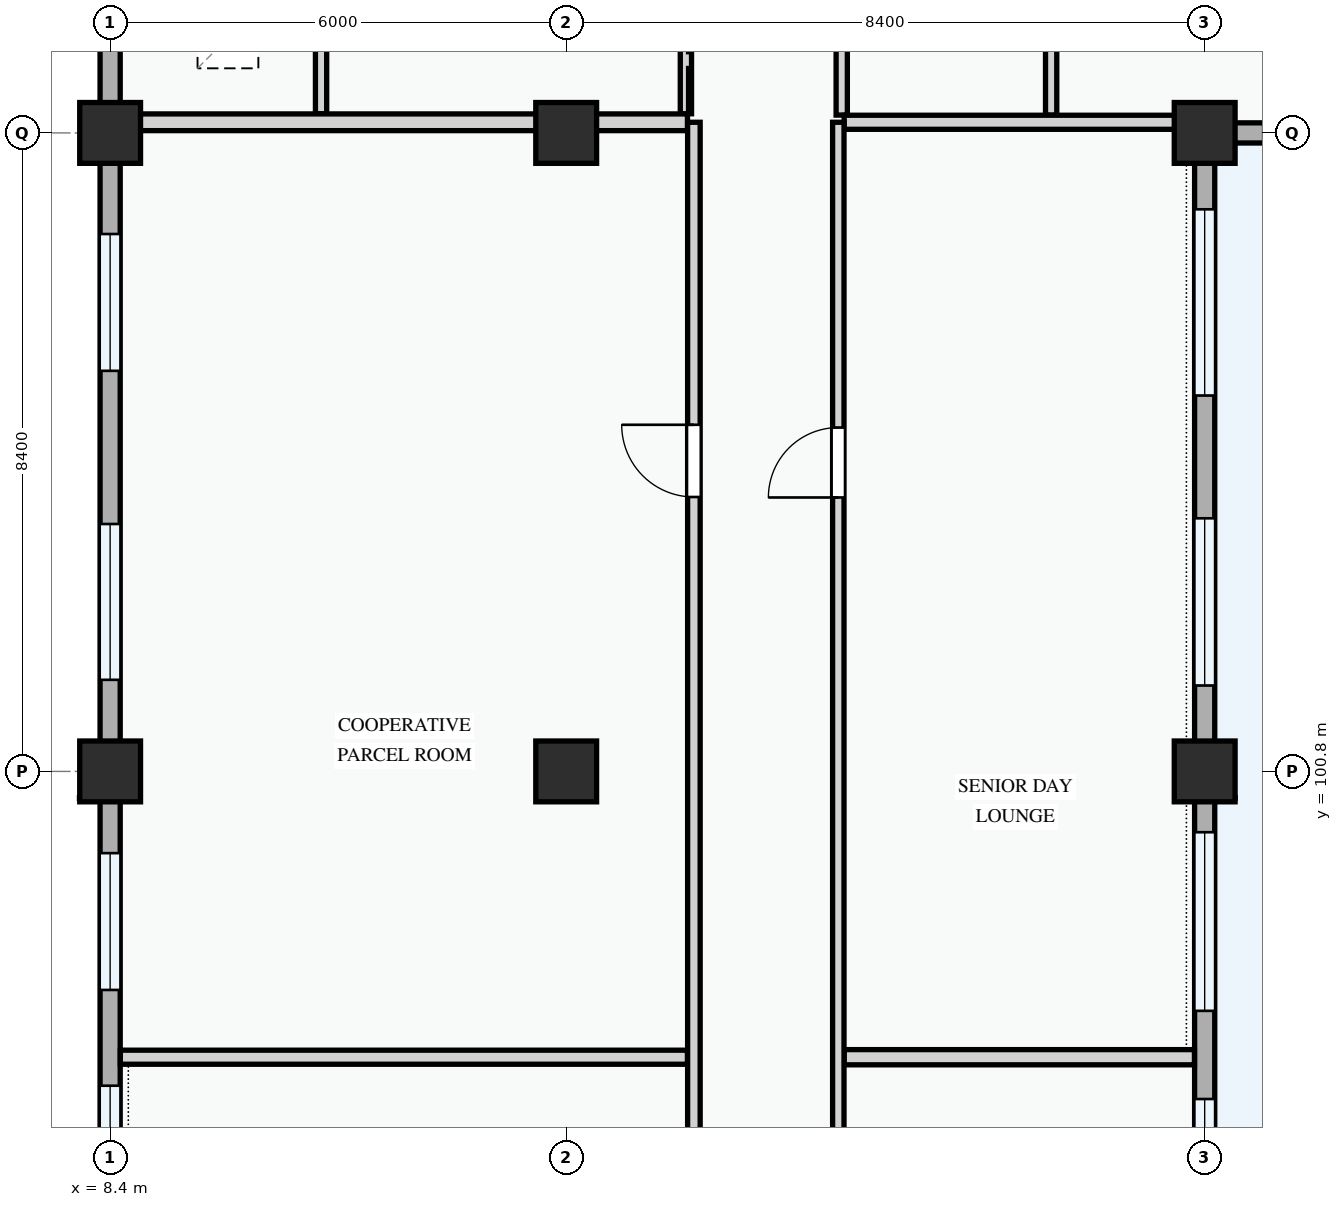
"""IFC4 building model, lengths in metres.
Left out: names, types, materials, properties, quantities, classifications, styles, units other than length and angle.
Written with IfcOpenShell. Run it as: python <this file> out.ifc"""

import sys

from ifc_helpers import new_model, si_unit, direction, frame, frame_2d, origin, origin_2d, place, context, subcontext, project, spatial, rectangle, extrude, element, fill, save


model = new_model("IFC4")
c1 = context("Model", 3, precision=1e-05, world=origin(), true_north=direction((0.0, 1.0)))
c2 = subcontext(c1, "Body", "Model", "MODEL_VIEW")
j1 = project(units=[si_unit("LENGTHUNIT", "METRE"), si_unit("PLANEANGLEUNIT", "RADIAN")], contexts=[c1])
p1 = place(None, origin())
s1 = spatial("IfcSite", under=j1, at=p1, CompositionType="ELEMENT")
p2 = place(p1, origin())
s2 = spatial("IfcBuilding", under=s1, at=p2, CompositionType="ELEMENT")
p3 = place(p2, origin())
s3 = spatial("IfcBuildingStorey", under=s2, at=p3, CompositionType="ELEMENT", Elevation=0.0)
for number, where, z_axis, x_axis in (
    (1, (8.4, 100.8, 0.0), (0.0, 0.0, 1.0), (1.0, 0.0, 0.0)),
    (2, (8.4, 109.2, 0.0), (0.0, 0.0, 1.0), (1.0, 0.0, 0.0)),
    (3, (14.4, 100.8, 0.0), (0.0, 0.0, 1.0), (1.0, 0.0, 0.0)),
    (4, (14.4, 109.2, 0.0), (0.0, 0.0, 1.0), (1.0, 0.0, 0.0)),
    (5, (22.8, 100.8, 0.0), (0.0, 0.0, 1.0), (1.0, 0.0, 0.0)),
    (6, (22.8, 109.2, 0.0), (0.0, 0.0, 1.0), (1.0, 0.0, 0.0)),
):
    element("IfcColumn", number, at=place(p3, frame(where, z_axis=z_axis, x_axis=x_axis)), inside=s3, PredefinedType="COLUMN", context=c2, shape_type="SweptSolid", body=[
        extrude(rectangle(XDim=0.8, YDim=0.8, at=origin_2d()), origin(), (0.0, 0.0, 1.0), 4.5),
    ])
p4 = place(p3, frame((22.8, 109.2, 0.0), z_axis=(0.0, 0.0, 1.0), x_axis=(1.0, 0.0, 0.0)))
e7 = element("IfcWall", 7, at=p4, inside=s3, PredefinedType="STANDARD", context=c2, shape_type="SweptSolid", body=[
    extrude(rectangle(XDim=6.0, YDim=0.265, at=frame_2d((3.0, 0.0))), origin(), (0.0, 0.0, 1.0), 3.585),
])
p5 = place(p4, frame((0.77, 0.0, 0.78)))
e8 = element("IfcOpeningElement", 8, at=p5, cuts=e7, PredefinedType="OPENING", context=c2, shape_type="SweptSolid", body=[
    extrude(rectangle(XDim=1.0, YDim=1.25, at=frame_2d((0.5, 0.625))), frame((0.0, 0.143, 0.0), z_axis=(0.0, -1.0, 0.0), x_axis=(1.0, 0.0, 0.0)), (0.0, 0.0, 1.0), 0.285),
])
p6 = place(p4, frame((3.405, 0.0, 0.78)))
e9 = element("IfcOpeningElement", 9, at=p6, cuts=e7, PredefinedType="OPENING", context=c2, shape_type="SweptSolid", body=[
    extrude(rectangle(XDim=1.35, YDim=1.55, at=frame_2d((0.675, 0.775))), frame((0.0, 0.143, 0.0), z_axis=(0.0, -1.0, 0.0), x_axis=(1.0, 0.0, 0.0)), (0.0, 0.0, 1.0), 0.285),
])
p7 = place(p3, frame((8.4, 115.2, 0.0), z_axis=(0.0, 0.0, 1.0), x_axis=(0.0, -1.0, 0.0)))
e10 = element("IfcWall", 10, at=p7, inside=s3, PredefinedType="STANDARD", context=c2, shape_type="SweptSolid", body=[
    extrude(rectangle(XDim=6.0, YDim=0.265, at=frame_2d((3.0, 0.0))), origin(), (0.0, 0.0, 1.0), 3.585),
])
p8 = place(p7, frame((0.545, 0.0, 0.78)))
e11 = element("IfcOpeningElement", 11, at=p8, cuts=e10, PredefinedType="OPENING", context=c2, shape_type="SweptSolid", body=[
    extrude(rectangle(XDim=0.9, YDim=1.2, at=frame_2d((0.45, 0.6))), frame((0.0, 0.143, 0.0), z_axis=(0.0, -1.0, 0.0), x_axis=(1.0, 0.0, 0.0)), (0.0, 0.0, 1.0), 0.285),
])
p9 = place(p7, frame((2.83, 0.0, 0.78)))
e12 = element("IfcOpeningElement", 12, at=p9, cuts=e10, PredefinedType="OPENING", context=c2, shape_type="SweptSolid", body=[
    extrude(rectangle(XDim=1.95, YDim=1.65, at=frame_2d((0.975, 0.825))), frame((0.0, 0.143, 0.0), z_axis=(0.0, -1.0, 0.0), x_axis=(1.0, 0.0, 0.0)), (0.0, 0.0, 1.0), 0.285),
])
p10 = place(p3, frame((8.4, 109.2, 0.0), z_axis=(0.0, 0.0, 1.0), x_axis=(0.0, -1.0, 0.0)))
e13 = element("IfcWall", 13, at=p10, inside=s3, PredefinedType="STANDARD", context=c2, shape_type="SweptSolid", body=[
    extrude(rectangle(XDim=8.4, YDim=0.265, at=frame_2d((4.2, 0.0))), origin(), (0.0, 0.0, 1.0), 3.485),
])
p11 = place(p10, frame((1.33, 0.0, 0.78)))
e14 = element("IfcOpeningElement", 14, at=p11, cuts=e13, PredefinedType="OPENING", context=c2, shape_type="SweptSolid", body=[
    extrude(rectangle(XDim=1.8, YDim=1.5, at=frame_2d((0.9, 0.75))), frame((0.0, 0.143, 0.0), z_axis=(0.0, -1.0, 0.0), x_axis=(1.0, 0.0, 0.0)), (0.0, 0.0, 1.0), 0.285),
])
p12 = place(p10, frame((5.145, 0.0, 0.78)))
e15 = element("IfcOpeningElement", 15, at=p12, cuts=e13, PredefinedType="OPENING", context=c2, shape_type="SweptSolid", body=[
    extrude(rectangle(XDim=2.05, YDim=1.6, at=frame_2d((1.025, 0.8))), frame((0.0, 0.143, 0.0), z_axis=(0.0, -1.0, 0.0), x_axis=(1.0, 0.0, 0.0)), (0.0, 0.0, 1.0), 0.285),
])
p13 = place(p3, frame((8.4, 100.8, 0.0), z_axis=(0.0, 0.0, 1.0), x_axis=(0.0, -1.0, 0.0)))
e16 = element("IfcWall", 16, at=p13, inside=s3, PredefinedType="STANDARD", context=c2, shape_type="SweptSolid", body=[
    extrude(rectangle(XDim=6.0, YDim=0.265, at=frame_2d((3.0, 0.0))), origin(), (0.0, 0.0, 1.0), 3.585),
])
p14 = place(p13, frame((1.075, 0.0, 0.78)))
e17 = element("IfcOpeningElement", 17, at=p14, cuts=e16, PredefinedType="OPENING", context=c2, shape_type="SweptSolid", body=[
    extrude(rectangle(XDim=1.8, YDim=1.7, at=frame_2d((0.9, 0.85))), frame((0.0, 0.143, 0.0), z_axis=(0.0, -1.0, 0.0), x_axis=(1.0, 0.0, 0.0)), (0.0, 0.0, 1.0), 0.285),
])
p15 = place(p13, frame((4.135, 0.0, 0.78)))
e18 = element("IfcOpeningElement", 18, at=p15, cuts=e16, PredefinedType="OPENING", context=c2, shape_type="SweptSolid", body=[
    extrude(rectangle(XDim=1.3, YDim=1.4, at=frame_2d((0.65, 0.7))), frame((0.0, 0.143, 0.0), z_axis=(0.0, -1.0, 0.0), x_axis=(1.0, 0.0, 0.0)), (0.0, 0.0, 1.0), 0.285),
])
p16 = place(p3, frame((22.8, 94.8, 0.0), z_axis=(0.0, 0.0, 1.0), x_axis=(0.0, 1.0, 0.0)))
e19 = element("IfcWall", 19, at=p16, inside=s3, PredefinedType="STANDARD", context=c2, shape_type="SweptSolid", body=[
    extrude(rectangle(XDim=6.0, YDim=0.265, at=frame_2d((3.0, 0.0))), origin(), (0.0, 0.0, 1.0), 3.585),
])
p17 = place(p16, frame((0.74, 0.0, 0.78)))
e20 = element("IfcOpeningElement", 20, at=p17, cuts=e19, PredefinedType="OPENING", context=c2, shape_type="SweptSolid", body=[
    extrude(rectangle(XDim=0.95, YDim=1.15, at=frame_2d((0.475, 0.575))), frame((0.0, 0.143, 0.0), z_axis=(0.0, -1.0, 0.0), x_axis=(1.0, 0.0, 0.0)), (0.0, 0.0, 1.0), 0.285),
])
p18 = place(p16, frame((2.85, 0.0, 0.78)))
e21 = element("IfcOpeningElement", 21, at=p18, cuts=e19, PredefinedType="OPENING", context=c2, shape_type="SweptSolid", body=[
    extrude(rectangle(XDim=2.35, YDim=1.55, at=frame_2d((1.175, 0.775))), frame((0.0, 0.143, 0.0), z_axis=(0.0, -1.0, 0.0), x_axis=(1.0, 0.0, 0.0)), (0.0, 0.0, 1.0), 0.285),
])
p19 = place(p3, frame((22.8, 100.8, 0.0), z_axis=(0.0, 0.0, 1.0), x_axis=(0.0, 1.0, 0.0)))
e22 = element("IfcWall", 22, at=p19, inside=s3, PredefinedType="STANDARD", context=c2, shape_type="SweptSolid", body=[
    extrude(rectangle(XDim=8.4, YDim=0.265, at=frame_2d((4.2, 0.0))), origin(), (0.0, 0.0, 1.0), 3.485),
])
p20 = place(p19, frame((1.13, 0.0, 0.78)))
e23 = element("IfcOpeningElement", 23, at=p20, cuts=e22, PredefinedType="OPENING", context=c2, shape_type="SweptSolid", body=[
    extrude(rectangle(XDim=2.2, YDim=1.5, at=frame_2d((1.1, 0.75))), frame((0.0, 0.143, 0.0), z_axis=(0.0, -1.0, 0.0), x_axis=(1.0, 0.0, 0.0)), (0.0, 0.0, 1.0), 0.285),
])
p21 = place(p19, frame((4.945, 0.0, 0.78)))
e24 = element("IfcOpeningElement", 24, at=p21, cuts=e22, PredefinedType="OPENING", context=c2, shape_type="SweptSolid", body=[
    extrude(rectangle(XDim=2.45, YDim=1.75, at=frame_2d((1.225, 0.875))), frame((0.0, 0.143, 0.0), z_axis=(0.0, -1.0, 0.0), x_axis=(1.0, 0.0, 0.0)), (0.0, 0.0, 1.0), 0.285),
])
for number, where, z_axis, x_axis in (
    (25, (11.175, 113.324, 0.0), (0.0, 0.0, 1.0), (0.0, -1.0, 0.0)),
    (26, (15.975, 113.324, 0.0), (0.0, 0.0, 1.0), (0.0, -1.0, 0.0)),
):
    element("IfcWall", number, at=place(p3, frame(where, z_axis=z_axis, x_axis=x_axis)), inside=s3, PredefinedType="PARTITIONING", context=c2, shape_type="SweptSolid", body=[
        extrude(rectangle(XDim=3.872, YDim=0.148, at=frame_2d((1.936, 0.0))), origin(), (0.0, 0.0, 1.0), 4.2),
    ])
for number, where, z_axis, x_axis in (
    (27, (18.025, 113.324, 0.0), (0.0, 0.0, 1.0), (0.0, -1.0, 0.0)),
    (28, (20.78, 113.324, 0.0), (0.0, 0.0, 1.0), (0.0, -1.0, 0.0)),
):
    element("IfcWall", number, at=place(p3, frame(where, z_axis=z_axis, x_axis=x_axis)), inside=s3, PredefinedType="PARTITIONING", context=c2, shape_type="SweptSolid", body=[
        extrude(rectangle(XDim=3.889, YDim=0.148, at=frame_2d((1.945, 0.0))), origin(), (0.0, 0.0, 1.0), 4.2),
    ])
p22 = place(p3, frame((8.534, 97.04, 0.0), z_axis=(0.0, 0.0, 1.0), x_axis=(1.0, 0.0, 0.0)))
e29 = element("IfcWall", 29, at=p22, inside=s3, PredefinedType="PARTITIONING", context=c2, shape_type="SweptSolid", body=[
    extrude(rectangle(XDim=7.461, YDim=0.185, at=frame_2d((3.73, 0.0))), origin(), (0.0, 0.0, 1.0), 4.2),
])
p23 = place(p3, frame((18.057, 97.04, 0.0), z_axis=(0.0, 0.0, 1.0), x_axis=(1.0, 0.0, 0.0)))
e30 = element("IfcWall", 30, at=p23, inside=s3, PredefinedType="PARTITIONING", context=c2, shape_type="SweptSolid", body=[
    extrude(rectangle(XDim=4.609, YDim=0.2, at=frame_2d((2.304, 0.0))), origin(), (0.0, 0.0, 1.0), 4.2),
])
p24 = place(p3, frame((8.534, 109.34, 0.0), z_axis=(0.0, 0.0, 1.0), x_axis=(1.0, 0.0, 0.0)))
e31 = element("IfcWall", 31, at=p24, inside=s3, PredefinedType="PARTITIONING", context=c2, shape_type="SweptSolid", body=[
    extrude(rectangle(XDim=7.461, YDim=0.22, at=frame_2d((3.73, 0.0))), origin(), (0.0, 0.0, 1.0), 3.485),
])
p25 = place(p3, frame((18.057, 109.34, 0.0), z_axis=(0.0, 0.0, 1.0), x_axis=(1.0, 0.0, 0.0)))
e32 = element("IfcWall", 32, at=p25, inside=s3, PredefinedType="PARTITIONING", context=c2, shape_type="SweptSolid", body=[
    extrude(rectangle(XDim=4.683, YDim=0.185, at=frame_2d((2.342, 0.0))), origin(), (0.0, 0.0, 1.0), 3.485),
])
p26 = place(p3, frame((16.08, 72.135, 0.0), z_axis=(0.0, 0.0, 1.0), x_axis=(0.0, 1.0, 0.0)))
e33 = element("IfcWall", 33, at=p26, inside=s3, PredefinedType="PARTITIONING", context=c2, shape_type="SweptSolid", body=[
    extrude(rectangle(XDim=37.206, YDim=0.165, at=frame_2d((18.603, 0.0))), origin(), (0.0, 0.0, 1.0), 4.2),
])
p27 = place(p26, frame((3.566, 0.0, 0.0)))
e34 = element("IfcOpeningElement", 34, at=p27, cuts=e33, PredefinedType="OPENING", context=c2, shape_type="SweptSolid", body=[
    extrude(rectangle(XDim=0.95, YDim=2.1, at=frame_2d((0.475, 1.05))), frame((0.0, 0.093, 0.0), z_axis=(0.0, -1.0, 0.0), x_axis=(1.0, 0.0, 0.0)), (0.0, 0.0, 1.0), 0.185),
])
p28 = place(p26, frame((18.091, 0.0, 0.0)))
e35 = element("IfcOpeningElement", 35, at=p28, cuts=e33, PredefinedType="OPENING", context=c2, shape_type="SweptSolid", body=[
    extrude(rectangle(XDim=0.95, YDim=2.1, at=frame_2d((0.475, 1.05))), frame((0.0, 0.093, 0.0), z_axis=(0.0, -1.0, 0.0), x_axis=(1.0, 0.0, 0.0)), (0.0, 0.0, 1.0), 0.185),
])
p29 = place(p26, frame((32.276, 0.0, 0.0)))
e36 = element("IfcOpeningElement", 36, at=p29, cuts=e33, PredefinedType="OPENING", context=c2, shape_type="SweptSolid", body=[
    extrude(rectangle(XDim=0.95, YDim=2.1, at=frame_2d((0.475, 1.05))), frame((0.0, 0.093, 0.0), z_axis=(0.0, -1.0, 0.0), x_axis=(1.0, 0.0, 0.0)), (0.0, 0.0, 1.0), 0.185),
])
p30 = place(p3, frame((17.98, 72.135, 0.0), z_axis=(0.0, 0.0, 1.0), x_axis=(0.0, 1.0, 0.0)))
e37 = element("IfcWall", 37, at=p30, inside=s3, PredefinedType="PARTITIONING", context=c2, shape_type="SweptSolid", body=[
    extrude(rectangle(XDim=37.206, YDim=0.15, at=frame_2d((18.603, 0.0))), origin(), (0.0, 0.0, 1.0), 4.2),
])
p31 = place(p30, frame((3.563, 0.0, 0.0)))
e38 = element("IfcOpeningElement", 38, at=p31, cuts=e37, PredefinedType="OPENING", context=c2, shape_type="SweptSolid", body=[
    extrude(rectangle(XDim=0.92, YDim=2.1, at=frame_2d((0.46, 1.05))), frame((0.0, 0.085, 0.0), z_axis=(0.0, -1.0, 0.0), x_axis=(1.0, 0.0, 0.0)), (0.0, 0.0, 1.0), 0.17),
])
p32 = place(p30, frame((18.085, 0.0, 0.0)))
e39 = element("IfcOpeningElement", 39, at=p32, cuts=e37, PredefinedType="OPENING", context=c2, shape_type="SweptSolid", body=[
    extrude(rectangle(XDim=0.96, YDim=2.12, at=frame_2d((0.48, 1.06))), frame((0.0, 0.085, 0.0), z_axis=(0.0, -1.0, 0.0), x_axis=(1.0, 0.0, 0.0)), (0.0, 0.0, 1.0), 0.17),
])
p33 = place(p30, frame((32.269, 0.0, 0.0)))
e40 = element("IfcOpeningElement", 40, at=p33, cuts=e37, PredefinedType="OPENING", context=c2, shape_type="SweptSolid", body=[
    extrude(rectangle(XDim=0.92, YDim=2.1, at=frame_2d((0.46, 1.05))), frame((0.0, 0.085, 0.0), z_axis=(0.0, -1.0, 0.0), x_axis=(1.0, 0.0, 0.0)), (0.0, 0.0, 1.0), 0.17),
])
p34 = place(p11, origin())
e41 = element("IfcWindow", 41, at=p34, inside=s3, PartitioningType="DOUBLE_PANEL_VERTICAL", PredefinedType="WINDOW", context=c2, shape_type="SweptSolid", body=[
    extrude(rectangle(XDim=1.8, YDim=1.5, at=frame_2d((0.9, 0.75))), frame((0.0, 0.03, 0.0), z_axis=(0.0, -1.0, 0.0), x_axis=(1.0, 0.0, 0.0)), (0.0, 0.0, 1.0), 0.06),
])
fill(e14, e41)
p35 = place(p12, origin())
e42 = element("IfcWindow", 42, at=p35, inside=s3, PartitioningType="DOUBLE_PANEL_VERTICAL", PredefinedType="WINDOW", context=c2, shape_type="SweptSolid", body=[
    extrude(rectangle(XDim=2.05, YDim=1.6, at=frame_2d((1.025, 0.8))), frame((0.0, 0.03, 0.0), z_axis=(0.0, -1.0, 0.0), x_axis=(1.0, 0.0, 0.0)), (0.0, 0.0, 1.0), 0.06),
])
fill(e15, e42)
p36 = place(p14, origin())
e43 = element("IfcWindow", 43, at=p36, inside=s3, PartitioningType="DOUBLE_PANEL_VERTICAL", PredefinedType="WINDOW", context=c2, shape_type="SweptSolid", body=[
    extrude(rectangle(XDim=1.8, YDim=1.7, at=frame_2d((0.9, 0.85))), frame((0.0, 0.03, 0.0), z_axis=(0.0, -1.0, 0.0), x_axis=(1.0, 0.0, 0.0)), (0.0, 0.0, 1.0), 0.06),
])
fill(e17, e43)
p37 = place(p15, origin())
e44 = element("IfcWindow", 44, at=p37, inside=s3, PartitioningType="SINGLE_PANEL", PredefinedType="WINDOW", context=c2, shape_type="SweptSolid", body=[
    extrude(rectangle(XDim=1.3, YDim=1.4, at=frame_2d((0.65, 0.7))), frame((0.0, 0.03, 0.0), z_axis=(0.0, -1.0, 0.0), x_axis=(1.0, 0.0, 0.0)), (0.0, 0.0, 1.0), 0.06),
])
fill(e18, e44)
p38 = place(p17, origin())
e45 = element("IfcWindow", 45, at=p38, inside=s3, PartitioningType="SINGLE_PANEL", PredefinedType="WINDOW", context=c2, shape_type="SweptSolid", body=[
    extrude(rectangle(XDim=0.95, YDim=1.15, at=frame_2d((0.475, 0.575))), frame((0.0, 0.03, 0.0), z_axis=(0.0, -1.0, 0.0), x_axis=(1.0, 0.0, 0.0)), (0.0, 0.0, 1.0), 0.06),
])
fill(e20, e45)
p39 = place(p18, origin())
e46 = element("IfcWindow", 46, at=p39, inside=s3, PartitioningType="DOUBLE_PANEL_VERTICAL", PredefinedType="WINDOW", context=c2, shape_type="SweptSolid", body=[
    extrude(rectangle(XDim=2.35, YDim=1.55, at=frame_2d((1.175, 0.775))), frame((0.0, 0.03, 0.0), z_axis=(0.0, -1.0, 0.0), x_axis=(1.0, 0.0, 0.0)), (0.0, 0.0, 1.0), 0.06),
])
fill(e21, e46)
p40 = place(p20, origin())
e47 = element("IfcWindow", 47, at=p40, inside=s3, PartitioningType="DOUBLE_PANEL_VERTICAL", PredefinedType="WINDOW", context=c2, shape_type="SweptSolid", body=[
    extrude(rectangle(XDim=2.2, YDim=1.5, at=frame_2d((1.1, 0.75))), frame((0.0, 0.03, 0.0), z_axis=(0.0, -1.0, 0.0), x_axis=(1.0, 0.0, 0.0)), (0.0, 0.0, 1.0), 0.06),
])
fill(e23, e47)
p41 = place(p21, origin())
e48 = element("IfcWindow", 48, at=p41, inside=s3, PartitioningType="DOUBLE_PANEL_VERTICAL", PredefinedType="WINDOW", context=c2, shape_type="SweptSolid", body=[
    extrude(rectangle(XDim=2.45, YDim=1.75, at=frame_2d((1.225, 0.875))), frame((0.0, 0.03, 0.0), z_axis=(0.0, -1.0, 0.0), x_axis=(1.0, 0.0, 0.0)), (0.0, 0.0, 1.0), 0.06),
])
fill(e24, e48)
p42 = place(p29, origin())
e49 = element("IfcDoor", 49, at=p42, inside=s3, OperationType="SINGLE_SWING_RIGHT", PredefinedType="DOOR", context=c2, shape_type="SweptSolid", body=[
    extrude(rectangle(XDim=0.95, YDim=2.1, at=frame_2d((0.475, 1.05))), frame((0.0, 0.025, 0.0), z_axis=(0.0, -1.0, 0.0), x_axis=(1.0, 0.0, 0.0)), (0.0, 0.0, 1.0), 0.05),
])
fill(e36, e49)
p43 = place(p33, origin())
e50 = element("IfcDoor", 50, at=p43, inside=s3, OperationType="SINGLE_SWING_LEFT", PredefinedType="DOOR", context=c2, shape_type="SweptSolid", body=[
    extrude(rectangle(XDim=0.92, YDim=2.1, at=frame_2d((0.46, 1.05))), frame((0.0, 0.025, 0.0), z_axis=(0.0, -1.0, 0.0), x_axis=(1.0, 0.0, 0.0)), (0.0, 0.0, 1.0), 0.05),
])
fill(e40, e50)
save(model, sys.argv[1])
